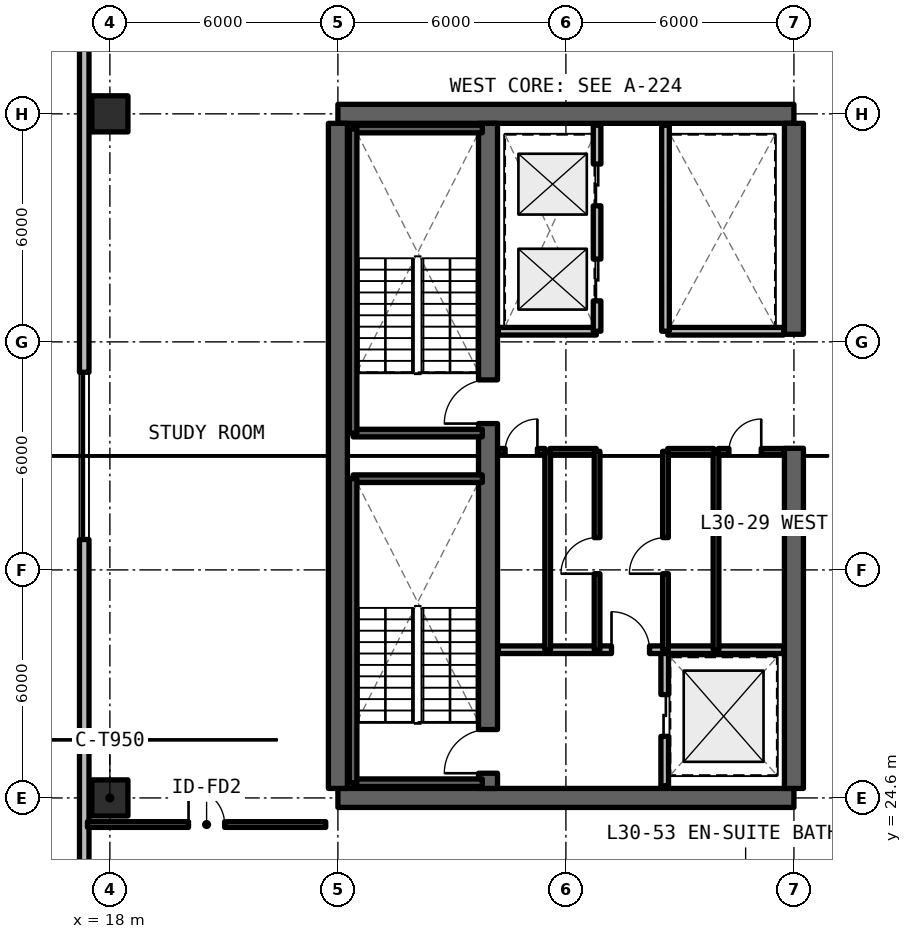
"""IFC4 building model, lengths in metres.
Left out: names, types, materials, properties, quantities, classifications, styles, units other than length and angle.
Written with IfcOpenShell. Run it as: python <this file> out.ifc"""

import sys

from ifc_helpers import new_model, si_unit, direction, frame, frame_2d, origin, origin_2d, place, context, subcontext, project, spatial, rectangle, extrude, element, fill, save


model = new_model("IFC4")
c1 = context("Model", 3, precision=1e-05, world=origin(), true_north=direction((0.0, 1.0)))
c2 = subcontext(c1, "Body", "Model", "MODEL_VIEW")
j1 = project(units=[si_unit("LENGTHUNIT", "METRE"), si_unit("PLANEANGLEUNIT", "RADIAN")], contexts=[c1])
p1 = place(None, origin())
s1 = spatial("IfcSite", under=j1, at=p1, CompositionType="ELEMENT")
p2 = place(p1, origin())
s2 = spatial("IfcBuilding", under=s1, at=p2, CompositionType="ELEMENT")
p3 = place(p2, frame((0.0, 0.0, 108.57)))
s3 = spatial("IfcBuildingStorey", under=s2, at=p3, CompositionType="ELEMENT", Elevation=108.57)
for number, where, z_axis, x_axis in (
    (1, (24.0, 24.6, 0.0), (0.0, 0.0, 1.0), (1.0, 0.0, 0.0)),
    (2, (36.0, 42.6, 0.0), (0.0, 0.0, 1.0), (-1.0, 0.0, 0.0)),
):
    element("IfcWall", number, at=place(p3, frame(where, z_axis=z_axis, x_axis=x_axis)), inside=s3, PredefinedType="SHEAR", context=c2, shape_type="SweptSolid", body=[
        extrude(rectangle(XDim=12.0, YDim=0.5, at=frame_2d((6.0, 0.0))), origin(), (0.0, 0.0, 1.0), 3.63),
    ])
p4 = place(p3, frame((24.0, 24.85, 0.0), z_axis=(0.0, 0.0, 1.0), x_axis=(0.0, 1.0, 0.0)))
e3 = element("IfcWall", 3, at=p4, inside=s3, PredefinedType="SHEAR", context=c2, shape_type="SweptSolid", body=[
    extrude(rectangle(XDim=17.5, YDim=0.5, at=frame_2d((8.75, 0.0))), origin(), (0.0, 0.0, 1.0), 3.63),
])
p5 = place(p3, frame((36.0, 24.85, 0.0), z_axis=(0.0, 0.0, 1.0), x_axis=(0.0, 1.0, 0.0)))
e4 = element("IfcWall", 4, at=p5, inside=s3, PredefinedType="SHEAR", context=c2, shape_type="SweptSolid", body=[
    extrude(rectangle(XDim=8.95, YDim=0.5, at=frame_2d((4.475, 0.0))), origin(), (0.0, 0.0, 1.0), 3.63),
])
p6 = place(p3, frame((36.0, 36.8, 0.0), z_axis=(0.0, 0.0, 1.0), x_axis=(0.0, 1.0, 0.0)))
e5 = element("IfcWall", 5, at=p6, inside=s3, PredefinedType="SHEAR", context=c2, shape_type="SweptSolid", body=[
    extrude(rectangle(XDim=5.55, YDim=0.5, at=frame_2d((2.775, 0.0))), origin(), (0.0, 0.0, 1.0), 3.63),
])
p7 = place(p3, frame((27.95, 24.85, 0.0), z_axis=(0.0, 0.0, 1.0), x_axis=(0.0, 1.0, 0.0)))
e6 = element("IfcWall", 6, at=p7, inside=s3, PredefinedType="SHEAR", context=c2, shape_type="SweptSolid", body=[
    extrude(rectangle(XDim=17.5, YDim=0.5, at=frame_2d((8.75, 0.0))), origin(), (0.0, 0.0, 1.0), 3.63),
])
p8 = place(p7, frame((0.4, 0.0, 0.0)))
e7 = element("IfcOpeningElement", 7, at=p8, cuts=e6, PredefinedType="OPENING", context=c2, shape_type="SweptSolid", body=[
    extrude(rectangle(XDim=1.15, YDim=2.15, at=frame_2d((0.575, 1.075))), frame((0.0, 0.26, 0.0), z_axis=(0.0, -1.0, 0.0), x_axis=(1.0, 0.0, 0.0)), (0.0, 0.0, 1.0), 0.52),
])
p9 = place(p7, frame((9.6, 0.0, 0.0)))
e8 = element("IfcOpeningElement", 8, at=p9, cuts=e6, PredefinedType="OPENING", context=c2, shape_type="SweptSolid", body=[
    extrude(rectangle(XDim=1.15, YDim=2.15, at=frame_2d((0.575, 1.075))), frame((0.0, 0.26, 0.0), z_axis=(0.0, -1.0, 0.0), x_axis=(1.0, 0.0, 0.0)), (0.0, 0.0, 1.0), 0.52),
])
for number, where, z_axis, x_axis in (
    (9, (18.0, 24.6, 0.0), (0.0, 0.0, 1.0), (1.0, 0.0, 0.0)),
    (10, (18.0, 42.6, 0.0), (0.0, 0.0, 1.0), (1.0, 0.0, 0.0)),
):
    element("IfcColumn", number, at=place(p3, frame(where, z_axis=z_axis, x_axis=x_axis)), inside=s3, PredefinedType="COLUMN", context=c2, shape_type="SweptSolid", body=[
        extrude(rectangle(XDim=0.95, YDim=0.95, at=origin_2d()), origin(), (0.0, 0.0, 1.0), 3.63),
    ])
p10 = place(p3, frame((17.325, 53.348, 0.0), z_axis=(0.0, 0.0, 1.0), x_axis=(0.0, -1.0, 0.0)))
e11 = element("IfcWall", 11, at=p10, inside=s3, PredefinedType="SOLIDWALL", context=c2, shape_type="SweptSolid", body=[
    extrude(rectangle(XDim=39.496, YDim=0.25, at=frame_2d((19.748, 0.0))), origin(), (0.0, 0.0, 1.0), 3.41),
])
p11 = place(p10, frame((17.548, 0.0, 0.78)))
e12 = element("IfcOpeningElement", 12, at=p11, cuts=e11, PredefinedType="OPENING", context=c2, shape_type="SweptSolid", body=[
    extrude(rectangle(XDim=4.4, YDim=1.66, at=frame_2d((2.2, 0.83))), frame((0.0, 0.135, 0.0), z_axis=(0.0, -1.0, 0.0), x_axis=(1.0, 0.0, 0.0)), (0.0, 0.0, 1.0), 0.27),
])
p12 = place(p10, frame((32.492, 0.0, 0.78)))
e13 = element("IfcOpeningElement", 13, at=p12, cuts=e11, PredefinedType="OPENING", context=c2, shape_type="SweptSolid", body=[
    extrude(rectangle(XDim=1.4, YDim=1.65, at=frame_2d((0.7, 0.825))), frame((0.0, 0.135, 0.0), z_axis=(0.0, -1.0, 0.0), x_axis=(1.0, 0.0, 0.0)), (0.0, 0.0, 1.0), 0.27),
])
p13 = place(p3, frame((32.6, 24.92, 0.0), z_axis=(0.0, 0.0, 1.0), x_axis=(0.0, 1.0, 0.0)))
e14 = element("IfcWall", 14, at=p13, inside=s3, PredefinedType="SOLIDWALL", context=c2, shape_type="SweptSolid", body=[
    extrude(rectangle(XDim=3.58, YDim=0.2, at=frame_2d((1.79, 0.0))), origin(), (0.0, 0.0, 1.0), 2.63),
])
p14 = place(p13, frame((1.3, 0.0, 0.0)))
e15 = element("IfcOpeningElement", 15, at=p14, cuts=e14, PredefinedType="OPENING", context=c2, shape_type="SweptSolid", body=[
    extrude(rectangle(XDim=1.1, YDim=2.2, at=frame_2d((0.55, 1.1))), frame((0.0, 0.11, 0.0), z_axis=(0.0, -1.0, 0.0), x_axis=(1.0, 0.0, 0.0)), (0.0, 0.0, 1.0), 0.22),
])
p15 = place(p3, frame((28.22, 28.5, 0.0), z_axis=(0.0, 0.0, 1.0), x_axis=(1.0, 0.0, 0.0)))
e16 = element("IfcWall", 16, at=p15, inside=s3, PredefinedType="SOLIDWALL", context=c2, shape_type="SweptSolid", body=[
    extrude(rectangle(XDim=7.51, YDim=0.2, at=frame_2d((3.755, 0.0))), origin(), (0.0, 0.0, 1.0), 2.63),
])
p16 = place(p15, frame((2.98, 0.0, 0.0)))
e17 = element("IfcOpeningElement", 17, at=p16, cuts=e16, PredefinedType="OPENING", context=c2, shape_type="SweptSolid", body=[
    extrude(rectangle(XDim=1.0, YDim=2.15, at=frame_2d((0.5, 1.075))), frame((0.0, 0.11, 0.0), z_axis=(0.0, -1.0, 0.0), x_axis=(1.0, 0.0, 0.0)), (0.0, 0.0, 1.0), 0.22),
])
p17 = place(p3, frame((29.52, 28.5, 0.0), z_axis=(0.0, 0.0, 1.0), x_axis=(0.0, 1.0, 0.0)))
e18 = element("IfcWall", 18, at=p17, inside=s3, PredefinedType="SOLIDWALL", context=c2, shape_type="SweptSolid", body=[
    extrude(rectangle(XDim=5.22, YDim=0.15, at=frame_2d((2.61, 0.0))), origin(), (0.0, 0.0, 1.0), 2.63),
])
p18 = place(p3, frame((28.22, 33.72, 0.0), z_axis=(0.0, 0.0, 1.0), x_axis=(1.0, 0.0, 0.0)))
e19 = element("IfcWall", 19, at=p18, inside=s3, PredefinedType="SOLIDWALL", context=c2, shape_type="SweptSolid", body=[
    extrude(rectangle(XDim=1.23, YDim=0.15, at=frame_2d((0.615, 0.0))), origin(), (0.0, 0.0, 1.0), 2.63),
])
p19 = place(p18, frame((0.18, 0.0, 0.0)))
e20 = element("IfcOpeningElement", 20, at=p19, cuts=e19, PredefinedType="OPENING", context=c2, shape_type="SweptSolid", body=[
    extrude(rectangle(XDim=0.85, YDim=2.1, at=frame_2d((0.425, 1.05))), frame((0.0, 0.085, 0.0), z_axis=(0.0, -1.0, 0.0), x_axis=(1.0, 0.0, 0.0)), (0.0, 0.0, 1.0), 0.17),
])
p20 = place(p3, frame((29.58, 33.72, 0.0), z_axis=(0.0, 0.0, 1.0), x_axis=(1.0, 0.0, 0.0)))
e21 = element("IfcWall", 21, at=p20, inside=s3, PredefinedType="SOLIDWALL", context=c2, shape_type="SweptSolid", body=[
    extrude(rectangle(XDim=1.22, YDim=0.15, at=frame_2d((0.61, 0.0))), origin(), (0.0, 0.0, 1.0), 2.63),
])
p21 = place(p3, frame((30.82, 28.5, 0.0), z_axis=(0.0, 0.0, 1.0), x_axis=(0.0, 1.0, 0.0)))
e22 = element("IfcWall", 22, at=p21, inside=s3, PredefinedType="SOLIDWALL", context=c2, shape_type="SweptSolid", body=[
    extrude(rectangle(XDim=5.22, YDim=0.15, at=frame_2d((2.61, 0.0))), origin(), (0.0, 0.0, 1.0), 2.63),
])
p22 = place(p21, frame((2.0, 0.0, 0.0)))
e23 = element("IfcOpeningElement", 23, at=p22, cuts=e22, PredefinedType="OPENING", context=c2, shape_type="SweptSolid", body=[
    extrude(rectangle(XDim=0.95, YDim=2.15, at=frame_2d((0.475, 1.075))), frame((0.0, 0.085, 0.0), z_axis=(0.0, -1.0, 0.0), x_axis=(1.0, 0.0, 0.0)), (0.0, 0.0, 1.0), 0.17),
])
p23 = place(p3, frame((33.95, 28.5, 0.0), z_axis=(0.0, 0.0, 1.0), x_axis=(0.0, 1.0, 0.0)))
e24 = element("IfcWall", 24, at=p23, inside=s3, PredefinedType="SOLIDWALL", context=c2, shape_type="SweptSolid", body=[
    extrude(rectangle(XDim=5.22, YDim=0.15, at=frame_2d((2.61, 0.0))), origin(), (0.0, 0.0, 1.0), 2.63),
])
p24 = place(p3, frame((32.68, 33.72, 0.0), z_axis=(0.0, 0.0, 1.0), x_axis=(1.0, 0.0, 0.0)))
e25 = element("IfcWall", 25, at=p24, inside=s3, PredefinedType="SOLIDWALL", context=c2, shape_type="SweptSolid", body=[
    extrude(rectangle(XDim=1.21, YDim=0.15, at=frame_2d((0.605, 0.0))), origin(), (0.0, 0.0, 1.0), 2.63),
])
p25 = place(p3, frame((34.01, 33.72, 0.0), z_axis=(0.0, 0.0, 1.0), x_axis=(1.0, 0.0, 0.0)))
e26 = element("IfcWall", 26, at=p25, inside=s3, PredefinedType="SOLIDWALL", context=c2, shape_type="SweptSolid", body=[
    extrude(rectangle(XDim=1.72, YDim=0.15, at=frame_2d((0.86, 0.0))), origin(), (0.0, 0.0, 1.0), 2.63),
])
p26 = place(p25, frame((0.28, 0.0, 0.0)))
e27 = element("IfcOpeningElement", 27, at=p26, cuts=e26, PredefinedType="OPENING", context=c2, shape_type="SweptSolid", body=[
    extrude(rectangle(XDim=0.85, YDim=2.1, at=frame_2d((0.425, 1.05))), frame((0.0, 0.085, 0.0), z_axis=(0.0, -1.0, 0.0), x_axis=(1.0, 0.0, 0.0)), (0.0, 0.0, 1.0), 0.17),
])
p27 = place(p3, frame((32.62, 28.5, 0.0), z_axis=(0.0, 0.0, 1.0), x_axis=(0.0, 1.0, 0.0)))
e28 = element("IfcWall", 28, at=p27, inside=s3, PredefinedType="SOLIDWALL", context=c2, shape_type="SweptSolid", body=[
    extrude(rectangle(XDim=5.22, YDim=0.15, at=frame_2d((2.61, 0.0))), origin(), (0.0, 0.0, 1.0), 2.63),
])
p28 = place(p27, frame((2.0, 0.0, 0.0)))
e29 = element("IfcOpeningElement", 29, at=p28, cuts=e28, PredefinedType="OPENING", context=c2, shape_type="SweptSolid", body=[
    extrude(rectangle(XDim=0.95, YDim=2.15, at=frame_2d((0.475, 1.075))), frame((0.0, 0.085, 0.0), z_axis=(0.0, -1.0, 0.0), x_axis=(1.0, 0.0, 0.0)), (0.0, 0.0, 1.0), 0.17),
])
p29 = place(p3, frame((28.22, 36.88, 0.0), z_axis=(0.0, 0.0, 1.0), x_axis=(1.0, 0.0, 0.0)))
e30 = element("IfcWall", 30, at=p29, inside=s3, PredefinedType="SOLIDWALL", context=c2, shape_type="SweptSolid", body=[
    extrude(rectangle(XDim=2.58, YDim=0.2, at=frame_2d((1.29, 0.0))), origin(), (0.0, 0.0, 1.0), 2.63),
])
p30 = place(p3, frame((30.82, 36.88, 0.0), z_axis=(0.0, 0.0, 1.0), x_axis=(0.0, 1.0, 0.0)))
e31 = element("IfcWall", 31, at=p30, inside=s3, PredefinedType="SOLIDWALL", context=c2, shape_type="SweptSolid", body=[
    extrude(rectangle(XDim=5.42, YDim=0.2, at=frame_2d((2.71, 0.0))), origin(), (0.0, 0.0, 1.0), 2.63),
])
p31 = place(p30, frame((0.8, 0.0, 0.0)))
e32 = element("IfcOpeningElement", 32, at=p31, cuts=e31, PredefinedType="OPENING", context=c2, shape_type="SweptSolid", body=[
    extrude(rectangle(XDim=1.1, YDim=2.2, at=frame_2d((0.55, 1.1))), frame((0.0, 0.11, 0.0), z_axis=(0.0, -1.0, 0.0), x_axis=(1.0, 0.0, 0.0)), (0.0, 0.0, 1.0), 0.22),
])
p32 = place(p30, frame((3.3, 0.0, 0.0)))
e33 = element("IfcOpeningElement", 33, at=p32, cuts=e31, PredefinedType="OPENING", context=c2, shape_type="SweptSolid", body=[
    extrude(rectangle(XDim=1.1, YDim=2.2, at=frame_2d((0.55, 1.1))), frame((0.0, 0.11, 0.0), z_axis=(0.0, -1.0, 0.0), x_axis=(1.0, 0.0, 0.0)), (0.0, 0.0, 1.0), 0.22),
])
p33 = place(p3, frame((32.68, 36.88, 0.0), z_axis=(0.0, 0.0, 1.0), x_axis=(1.0, 0.0, 0.0)))
e34 = element("IfcWall", 34, at=p33, inside=s3, PredefinedType="SOLIDWALL", context=c2, shape_type="SweptSolid", body=[
    extrude(rectangle(XDim=3.05, YDim=0.2, at=frame_2d((1.525, 0.0))), origin(), (0.0, 0.0, 1.0), 2.63),
])
p34 = place(p3, frame((32.62, 36.88, 0.0), z_axis=(0.0, 0.0, 1.0), x_axis=(0.0, 1.0, 0.0)))
e35 = element("IfcWall", 35, at=p34, inside=s3, PredefinedType="SOLIDWALL", context=c2, shape_type="SweptSolid", body=[
    extrude(rectangle(XDim=5.42, YDim=0.2, at=frame_2d((2.71, 0.0))), origin(), (0.0, 0.0, 1.0), 2.63),
])
p35 = place(p3, frame((17.41, 23.9, 0.0), z_axis=(0.0, 0.0, 1.0), x_axis=(1.0, 0.0, 0.0)))
e36 = element("IfcWall", 36, at=p35, inside=s3, PredefinedType="SOLIDWALL", context=c2, shape_type="SweptSolid", body=[
    extrude(rectangle(XDim=6.27, YDim=0.15, at=frame_2d((3.135, 0.0))), origin(), (0.0, 0.0, 1.0), 2.63),
])
p36 = place(p35, frame((2.66, 0.0, 0.0)))
e37 = element("IfcOpeningElement", 37, at=p36, cuts=e36, PredefinedType="OPENING", context=c2, shape_type="SweptSolid", body=[
    extrude(rectangle(XDim=0.95, YDim=2.15, at=frame_2d((0.475, 1.075))), frame((0.0, 0.085, 0.0), z_axis=(0.0, -1.0, 0.0), x_axis=(1.0, 0.0, 0.0)), (0.0, 0.0, 1.0), 0.17),
])
for number, where, z_axis, x_axis in (
    (38, (24.4, 25.0, 0.0), (0.0, 0.0, 1.0), (1.0, 0.0, 0.0)),
    (39, (27.8, 33.0, 0.0), (0.0, 0.0, 1.0), (-1.0, 0.0, 0.0)),
):
    element("IfcWall", number, at=place(p3, frame(where, z_axis=z_axis, x_axis=x_axis)), inside=s3, PredefinedType="SOLIDWALL", context=c2, shape_type="SweptSolid", body=[
        extrude(rectangle(XDim=3.4, YDim=0.2, at=frame_2d((1.7, 0.0))), origin(), (0.0, 0.0, 1.0), 3.63),
    ])
p37 = place(p3, frame((24.4, 33.0, 0.0), z_axis=(0.0, 0.0, 1.0), x_axis=(0.0, -1.0, 0.0)))
e40 = element("IfcWall", 40, at=p37, inside=s3, PredefinedType="SOLIDWALL", context=c2, shape_type="SweptSolid", body=[
    extrude(rectangle(XDim=8.0, YDim=0.2, at=frame_2d((4.0, 0.0))), origin(), (0.0, 0.0, 1.0), 3.63),
])
for number, where, z_axis, x_axis in (
    (41, (24.4, 34.2, 0.0), (0.0, 0.0, 1.0), (1.0, 0.0, 0.0)),
    (42, (27.8, 42.2, 0.0), (0.0, 0.0, 1.0), (-1.0, 0.0, 0.0)),
):
    element("IfcWall", number, at=place(p3, frame(where, z_axis=z_axis, x_axis=x_axis)), inside=s3, PredefinedType="SOLIDWALL", context=c2, shape_type="SweptSolid", body=[
        extrude(rectangle(XDim=3.4, YDim=0.2, at=frame_2d((1.7, 0.0))), origin(), (0.0, 0.0, 1.0), 3.63),
    ])
p38 = place(p3, frame((24.4, 42.2, 0.0), z_axis=(0.0, 0.0, 1.0), x_axis=(0.0, -1.0, 0.0)))
e43 = element("IfcWall", 43, at=p38, inside=s3, PredefinedType="SOLIDWALL", context=c2, shape_type="SweptSolid", body=[
    extrude(rectangle(XDim=8.0, YDim=0.2, at=frame_2d((4.0, 0.0))), origin(), (0.0, 0.0, 1.0), 3.63),
])
p39 = place(p11, origin())
e44 = element("IfcWindow", 44, at=p39, inside=s3, PartitioningType="SINGLE_PANEL", PredefinedType="WINDOW", context=c2, shape_type="SweptSolid", body=[
    extrude(rectangle(XDim=4.4, YDim=1.66, at=frame_2d((2.2, 0.83))), frame((0.0, 0.03, 0.0), z_axis=(0.0, -1.0, 0.0), x_axis=(1.0, 0.0, 0.0)), (0.0, 0.0, 1.0), 0.06),
])
fill(e12, e44)
p40 = place(p14, origin())
e45 = element("IfcDoor", 45, at=p40, inside=s3, OperationType="SLIDING_TO_LEFT", PredefinedType="DOOR", context=c2, shape_type="SweptSolid", body=[
    extrude(rectangle(XDim=1.1, YDim=2.2, at=frame_2d((0.55, 1.1))), frame((0.0, 0.025, 0.0), z_axis=(0.0, -1.0, 0.0), x_axis=(1.0, 0.0, 0.0)), (0.0, 0.0, 1.0), 0.05),
])
fill(e15, e45)
p41 = place(p16, origin())
e46 = element("IfcDoor", 46, at=p41, inside=s3, OperationType="SINGLE_SWING_LEFT", PredefinedType="DOOR", context=c2, shape_type="SweptSolid", body=[
    extrude(rectangle(XDim=1.0, YDim=2.15, at=frame_2d((0.5, 1.075))), frame((0.0, 0.025, 0.0), z_axis=(0.0, -1.0, 0.0), x_axis=(1.0, 0.0, 0.0)), (0.0, 0.0, 1.0), 0.05),
])
fill(e17, e46)
p42 = place(p19, origin())
e47 = element("IfcDoor", 47, at=p42, inside=s3, OperationType="SINGLE_SWING_RIGHT", PredefinedType="DOOR", context=c2, shape_type="SweptSolid", body=[
    extrude(rectangle(XDim=0.85, YDim=2.1, at=frame_2d((0.425, 1.05))), frame((0.0, 0.025, 0.0), z_axis=(0.0, -1.0, 0.0), x_axis=(1.0, 0.0, 0.0)), (0.0, 0.0, 1.0), 0.05),
])
fill(e20, e47)
p43 = place(p22, origin())
e48 = element("IfcDoor", 48, at=p43, inside=s3, OperationType="SINGLE_SWING_LEFT", PredefinedType="DOOR", context=c2, shape_type="SweptSolid", body=[
    extrude(rectangle(XDim=0.95, YDim=2.15, at=frame_2d((0.475, 1.075))), frame((0.0, 0.025, 0.0), z_axis=(0.0, -1.0, 0.0), x_axis=(1.0, 0.0, 0.0)), (0.0, 0.0, 1.0), 0.05),
])
fill(e23, e48)
p44 = place(p26, origin())
e49 = element("IfcDoor", 49, at=p44, inside=s3, OperationType="SINGLE_SWING_RIGHT", PredefinedType="DOOR", context=c2, shape_type="SweptSolid", body=[
    extrude(rectangle(XDim=0.85, YDim=2.1, at=frame_2d((0.425, 1.05))), frame((0.0, 0.025, 0.0), z_axis=(0.0, -1.0, 0.0), x_axis=(1.0, 0.0, 0.0)), (0.0, 0.0, 1.0), 0.05),
])
fill(e27, e49)
p45 = place(p28, origin())
e50 = element("IfcDoor", 50, at=p45, inside=s3, OperationType="SINGLE_SWING_LEFT", PredefinedType="DOOR", context=c2, shape_type="SweptSolid", body=[
    extrude(rectangle(XDim=0.95, YDim=2.15, at=frame_2d((0.475, 1.075))), frame((0.0, 0.025, 0.0), z_axis=(0.0, -1.0, 0.0), x_axis=(1.0, 0.0, 0.0)), (0.0, 0.0, 1.0), 0.05),
])
fill(e29, e50)
p46 = place(p31, origin())
e51 = element("IfcDoor", 51, at=p46, inside=s3, OperationType="SLIDING_TO_LEFT", PredefinedType="DOOR", context=c2, shape_type="SweptSolid", body=[
    extrude(rectangle(XDim=1.1, YDim=2.2, at=frame_2d((0.55, 1.1))), frame((0.0, 0.025, 0.0), z_axis=(0.0, -1.0, 0.0), x_axis=(1.0, 0.0, 0.0)), (0.0, 0.0, 1.0), 0.05),
])
fill(e32, e51)
p47 = place(p32, origin())
e52 = element("IfcDoor", 52, at=p47, inside=s3, OperationType="SLIDING_TO_RIGHT", PredefinedType="DOOR", context=c2, shape_type="SweptSolid", body=[
    extrude(rectangle(XDim=1.1, YDim=2.2, at=frame_2d((0.55, 1.1))), frame((0.0, 0.025, 0.0), z_axis=(0.0, -1.0, 0.0), x_axis=(1.0, 0.0, 0.0)), (0.0, 0.0, 1.0), 0.05),
])
fill(e33, e52)
p48 = place(p36, origin())
e53 = element("IfcDoor", 53, at=p48, inside=s3, OperationType="SINGLE_SWING_LEFT", PredefinedType="DOOR", context=c2, shape_type="SweptSolid", body=[
    extrude(rectangle(XDim=0.95, YDim=2.15, at=frame_2d((0.475, 1.075))), frame((0.0, 0.025, 0.0), z_axis=(0.0, -1.0, 0.0), x_axis=(1.0, 0.0, 0.0)), (0.0, 0.0, 1.0), 0.05),
])
fill(e37, e53)
p49 = place(p8, origin())
e54 = element("IfcDoor", 54, at=p49, inside=s3, OperationType="SINGLE_SWING_RIGHT", PredefinedType="DOOR", context=c2, shape_type="SweptSolid", body=[
    extrude(rectangle(XDim=1.15, YDim=2.15, at=frame_2d((0.575, 1.075))), frame((0.0, 0.025, 0.0), z_axis=(0.0, -1.0, 0.0), x_axis=(1.0, 0.0, 0.0)), (0.0, 0.0, 1.0), 0.05),
])
fill(e7, e54)
p50 = place(p9, origin())
e55 = element("IfcDoor", 55, at=p50, inside=s3, OperationType="SINGLE_SWING_LEFT", PredefinedType="DOOR", context=c2, shape_type="SweptSolid", body=[
    extrude(rectangle(XDim=1.15, YDim=2.15, at=frame_2d((0.575, 1.075))), frame((0.0, 0.025, 0.0), z_axis=(0.0, -1.0, 0.0), x_axis=(1.0, 0.0, 0.0)), (0.0, 0.0, 1.0), 0.05),
])
fill(e8, e55)
save(model, sys.argv[1])
